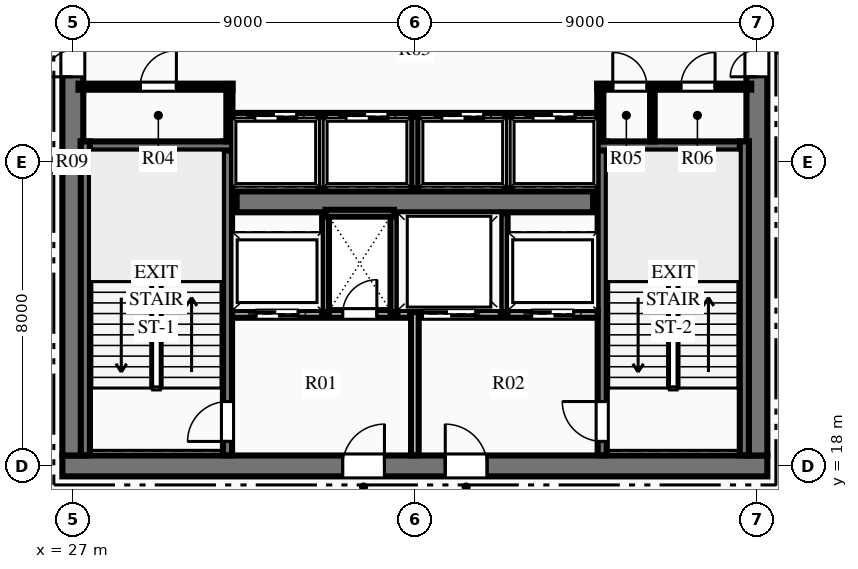
"""IFC4 building model, lengths in metres.
Left out: names, types, materials, properties, quantities, classifications, styles, units other than length and angle.
Written with IfcOpenShell. Run it as: python <this file> out.ifc"""

import sys

from ifc_helpers import new_model, si_unit, direction, frame, frame_2d, origin, place, context, subcontext, project, spatial, rectangle, extrude, element, fill, save


model = new_model("IFC4")
c1 = context("Model", 3, precision=1e-05, world=origin(), true_north=direction((0.0, 1.0)))
c2 = subcontext(c1, "Body", "Model", "MODEL_VIEW")
j1 = project(units=[si_unit("LENGTHUNIT", "METRE"), si_unit("PLANEANGLEUNIT", "RADIAN")], contexts=[c1])
p1 = place(None, origin())
s1 = spatial("IfcSite", under=j1, at=p1, CompositionType="ELEMENT")
p2 = place(p1, origin())
s2 = spatial("IfcBuilding", under=s1, at=p2, CompositionType="ELEMENT")
p3 = place(p2, frame((0.0, 0.0, 105.45)))
s3 = spatial("IfcBuildingStorey", under=s2, at=p3, CompositionType="ELEMENT", Elevation=105.45)
p4 = place(p3, frame((26.725, 18.0, 0.0), z_axis=(0.0, 0.0, 1.0), x_axis=(1.0, 0.0, 0.0)))
e1 = element("IfcWall", 1, at=p4, inside=s3, PredefinedType="SHEAR", context=c2, shape_type="SweptSolid", body=[
    extrude(rectangle(XDim=18.55, YDim=0.55, at=frame_2d((9.275, 0.0))), origin(), (0.0, 0.0, 1.0), 3.75),
])
p5 = place(p4, frame((7.375, 0.0, 0.0)))
e2 = element("IfcOpeningElement", 2, at=p5, cuts=e1, PredefinedType="OPENING", context=c2, shape_type="SweptSolid", body=[
    extrude(rectangle(XDim=1.1, YDim=2.15, at=frame_2d((0.55, 1.075))), frame((0.0, 0.285, 0.0), z_axis=(0.0, -1.0, 0.0), x_axis=(1.0, 0.0, 0.0)), (0.0, 0.0, 1.0), 0.57),
])
p6 = place(p4, frame((10.075, 0.0, 0.0)))
e3 = element("IfcOpeningElement", 3, at=p6, cuts=e1, PredefinedType="OPENING", context=c2, shape_type="SweptSolid", body=[
    extrude(rectangle(XDim=1.1, YDim=2.15, at=frame_2d((0.55, 1.075))), frame((0.0, 0.285, 0.0), z_axis=(0.0, -1.0, 0.0), x_axis=(1.0, 0.0, 0.0)), (0.0, 0.0, 1.0), 0.57),
])
p7 = place(p3, frame((27.0, 18.275, 0.0), z_axis=(0.0, 0.0, 1.0), x_axis=(0.0, 1.0, 0.0)))
e4 = element("IfcWall", 4, at=p7, inside=s3, PredefinedType="SHEAR", context=c2, shape_type="SweptSolid", body=[
    extrude(rectangle(XDim=15.45, YDim=0.55, at=frame_2d((7.725, 0.0))), origin(), (0.0, 0.0, 1.0), 3.75),
])
p8 = place(p7, frame((9.965, 0.0, 0.0)))
e5 = element("IfcOpeningElement", 5, at=p8, cuts=e4, PredefinedType="OPENING", context=c2, shape_type="SweptSolid", body=[
    extrude(rectangle(XDim=1.4, YDim=2.2, at=frame_2d((0.7, 1.1))), frame((0.0, 0.285, 0.0), z_axis=(0.0, -1.0, 0.0), x_axis=(1.0, 0.0, 0.0)), (0.0, 0.0, 1.0), 0.57),
])
p9 = place(p3, frame((45.0, 18.275, 0.0), z_axis=(0.0, 0.0, 1.0), x_axis=(0.0, 1.0, 0.0)))
e6 = element("IfcWall", 6, at=p9, inside=s3, PredefinedType="SHEAR", context=c2, shape_type="SweptSolid", body=[
    extrude(rectangle(XDim=15.45, YDim=0.55, at=frame_2d((7.725, 0.0))), origin(), (0.0, 0.0, 1.0), 3.75),
])
p10 = place(p9, frame((9.965, 0.0, 0.0)))
e7 = element("IfcOpeningElement", 7, at=p10, cuts=e6, PredefinedType="OPENING", context=c2, shape_type="SweptSolid", body=[
    extrude(rectangle(XDim=1.4, YDim=2.2, at=frame_2d((0.7, 1.1))), frame((0.0, 0.285, 0.0), z_axis=(0.0, -1.0, 0.0), x_axis=(1.0, 0.0, 0.0)), (0.0, 0.0, 1.0), 0.57),
])
p11 = place(p3, frame((31.31, 24.95, 0.0), z_axis=(0.0, 0.0, 1.0), x_axis=(1.0, 0.0, 0.0)))
e8 = element("IfcWall", 8, at=p11, inside=s3, PredefinedType="SHEAR", context=c2, shape_type="SweptSolid", body=[
    extrude(rectangle(XDim=9.38, YDim=0.55, at=frame_2d((4.69, 0.0))), origin(), (0.0, 0.0, 1.0), 3.75),
])
p12 = place(p3, frame((31.07, 18.28, 0.0), z_axis=(0.0, 0.0, 1.0), x_axis=(0.0, 1.0, 0.0)))
e9 = element("IfcWall", 9, at=p12, inside=s3, PredefinedType="SHEAR", context=c2, shape_type="SweptSolid", body=[
    extrude(rectangle(XDim=8.26, YDim=0.24, at=frame_2d((4.13, 0.0))), origin(), (0.0, 0.0, 1.0), 3.75),
])
p13 = place(p12, frame((0.365, 0.0, 0.0)))
e10 = element("IfcOpeningElement", 10, at=p13, cuts=e9, PredefinedType="OPENING", context=c2, shape_type="SweptSolid", body=[
    extrude(rectangle(XDim=1.05, YDim=2.15, at=frame_2d((0.525, 1.075))), frame((0.0, 0.13, 0.0), z_axis=(0.0, -1.0, 0.0), x_axis=(1.0, 0.0, 0.0)), (0.0, 0.0, 1.0), 0.26),
])
p14 = place(p3, frame((27.21, 26.42, 0.0), z_axis=(0.0, 0.0, 1.0), x_axis=(1.0, 0.0, 0.0)))
e11 = element("IfcWall", 11, at=p14, inside=s3, PredefinedType="SHEAR", context=c2, shape_type="SweptSolid", body=[
    extrude(rectangle(XDim=3.98, YDim=0.24, at=frame_2d((1.99, 0.0))), origin(), (0.0, 0.0, 1.0), 3.75),
])
p15 = place(p3, frame((27.33, 18.28, 0.0), z_axis=(0.0, 0.0, 1.0), x_axis=(0.0, 1.0, 0.0)))
e12 = element("IfcWall", 12, at=p15, inside=s3, PredefinedType="SHEAR", context=c2, shape_type="SweptSolid", body=[
    extrude(rectangle(XDim=8.26, YDim=0.24, at=frame_2d((4.13, 0.0))), origin(), (0.0, 0.0, 1.0), 3.75),
])
p16 = place(p3, frame((40.93, 18.28, 0.0), z_axis=(0.0, 0.0, 1.0), x_axis=(0.0, 1.0, 0.0)))
e13 = element("IfcWall", 13, at=p16, inside=s3, PredefinedType="SHEAR", context=c2, shape_type="SweptSolid", body=[
    extrude(rectangle(XDim=8.26, YDim=0.24, at=frame_2d((4.13, 0.0))), origin(), (0.0, 0.0, 1.0), 3.75),
])
p17 = place(p16, frame((0.365, 0.0, 0.0)))
e14 = element("IfcOpeningElement", 14, at=p17, cuts=e13, PredefinedType="OPENING", context=c2, shape_type="SweptSolid", body=[
    extrude(rectangle(XDim=1.05, YDim=2.15, at=frame_2d((0.525, 1.075))), frame((0.0, 0.13, 0.0), z_axis=(0.0, -1.0, 0.0), x_axis=(1.0, 0.0, 0.0)), (0.0, 0.0, 1.0), 0.26),
])
p18 = place(p3, frame((40.81, 26.42, 0.0), z_axis=(0.0, 0.0, 1.0), x_axis=(1.0, 0.0, 0.0)))
e15 = element("IfcWall", 15, at=p18, inside=s3, PredefinedType="SHEAR", context=c2, shape_type="SweptSolid", body=[
    extrude(rectangle(XDim=3.98, YDim=0.24, at=frame_2d((1.99, 0.0))), origin(), (0.0, 0.0, 1.0), 3.75),
])
p19 = place(p3, frame((44.67, 18.28, 0.0), z_axis=(0.0, 0.0, 1.0), x_axis=(0.0, 1.0, 0.0)))
e16 = element("IfcWall", 16, at=p19, inside=s3, PredefinedType="SHEAR", context=c2, shape_type="SweptSolid", body=[
    extrude(rectangle(XDim=8.26, YDim=0.24, at=frame_2d((4.13, 0.0))), origin(), (0.0, 0.0, 1.0), 3.75),
])
p20 = place(p3, frame((36.0, 18.28, 0.0), z_axis=(0.0, 0.0, 1.0), x_axis=(0.0, 1.0, 0.0)))
e17 = element("IfcWall", 17, at=p20, inside=s3, PredefinedType="PARTITIONING", context=c2, shape_type="SweptSolid", body=[
    extrude(rectangle(XDim=3.77, YDim=0.2, at=frame_2d((1.885, 0.0))), origin(), (0.0, 0.0, 1.0), 3.45),
])
p21 = place(p3, frame((31.19, 22.0, 0.0), z_axis=(0.0, 0.0, 1.0), x_axis=(1.0, 0.0, 0.0)))
e18 = element("IfcWall", 18, at=p21, inside=s3, PredefinedType="PARTITIONING", context=c2, shape_type="SweptSolid", body=[
    extrude(rectangle(XDim=4.69, YDim=0.2, at=frame_2d((2.345, 0.0))), origin(), (0.0, 0.0, 1.0), 3.45),
])
p22 = place(p21, frame((2.91, 0.0, 0.0)))
e19 = element("IfcOpeningElement", 19, at=p22, cuts=e18, PredefinedType="OPENING", context=c2, shape_type="SweptSolid", body=[
    extrude(rectangle(XDim=0.9, YDim=2.15, at=frame_2d((0.45, 1.075))), frame((0.0, 0.11, 0.0), z_axis=(0.0, -1.0, 0.0), x_axis=(1.0, 0.0, 0.0)), (0.0, 0.0, 1.0), 0.22),
])
p23 = place(p21, frame((0.635, 0.0, 0.0)))
e20 = element("IfcOpeningElement", 20, at=p23, cuts=e18, PredefinedType="OPENING", context=c2, shape_type="SweptSolid", body=[
    extrude(rectangle(XDim=1.1, YDim=2.15, at=frame_2d((0.55, 1.075))), frame((0.0, 0.11, 0.0), z_axis=(0.0, -1.0, 0.0), x_axis=(1.0, 0.0, 0.0)), (0.0, 0.0, 1.0), 0.22),
])
p24 = place(p3, frame((36.12, 22.0, 0.0), z_axis=(0.0, 0.0, 1.0), x_axis=(1.0, 0.0, 0.0)))
e21 = element("IfcWall", 21, at=p24, inside=s3, PredefinedType="PARTITIONING", context=c2, shape_type="SweptSolid", body=[
    extrude(rectangle(XDim=4.69, YDim=0.2, at=frame_2d((2.345, 0.0))), origin(), (0.0, 0.0, 1.0), 3.45),
])
p25 = place(p24, frame((2.955, 0.0, 0.0)))
e22 = element("IfcOpeningElement", 22, at=p25, cuts=e21, PredefinedType="OPENING", context=c2, shape_type="SweptSolid", body=[
    extrude(rectangle(XDim=1.1, YDim=2.15, at=frame_2d((0.55, 1.075))), frame((0.0, 0.11, 0.0), z_axis=(0.0, -1.0, 0.0), x_axis=(1.0, 0.0, 0.0)), (0.0, 0.0, 1.0), 0.22),
])
p26 = place(p24, frame((0.08, 0.0, 0.0)))
e23 = element("IfcOpeningElement", 23, at=p26, cuts=e21, PredefinedType="OPENING", context=c2, shape_type="SweptSolid", body=[
    extrude(rectangle(XDim=1.4, YDim=2.2, at=frame_2d((0.7, 1.1))), frame((0.0, 0.11, 0.0), z_axis=(0.0, -1.0, 0.0), x_axis=(1.0, 0.0, 0.0)), (0.0, 0.0, 1.0), 0.22),
])
for number, where, z_axis, x_axis in (
    (24, (33.65, 22.05, 0.0), (0.0, 0.0, 1.0), (0.0, 1.0, 0.0)),
    (25, (35.45, 22.05, 0.0), (0.0, 0.0, 1.0), (0.0, 1.0, 0.0)),
):
    element("IfcWall", number, at=place(p3, frame(where, z_axis=z_axis, x_axis=x_axis)), inside=s3, PredefinedType="PARTITIONING", context=c2, shape_type="SweptSolid", body=[
        extrude(rectangle(XDim=2.6, YDim=0.18, at=frame_2d((1.3, 0.0))), origin(), (0.0, 0.0, 1.0), 3.45),
    ])
p27 = place(p3, frame((33.65, 24.65, 0.0), z_axis=(0.0, 0.0, 1.0), x_axis=(1.0, 0.0, 0.0)))
e26 = element("IfcWall", 26, at=p27, inside=s3, PredefinedType="PARTITIONING", context=c2, shape_type="SweptSolid", body=[
    extrude(rectangle(XDim=1.8, YDim=0.18, at=frame_2d((0.9, 0.0))), origin(), (0.0, 0.0, 1.0), 3.45),
])
p28 = place(p3, frame((38.35, 22.05, 0.0), z_axis=(0.0, 0.0, 1.0), x_axis=(0.0, 1.0, 0.0)))
e27 = element("IfcWall", 27, at=p28, inside=s3, PredefinedType="PARTITIONING", context=c2, shape_type="SweptSolid", body=[
    extrude(rectangle(XDim=2.6, YDim=0.18, at=frame_2d((1.3, 0.0))), origin(), (0.0, 0.0, 1.0), 3.45),
])
p29 = place(p3, frame((27.15, 27.98, 0.0), z_axis=(0.0, 0.0, 1.0), x_axis=(1.0, 0.0, 0.0)))
e28 = element("IfcWall", 28, at=p29, inside=s3, PredefinedType="PARTITIONING", context=c2, shape_type="SweptSolid", body=[
    extrude(rectangle(XDim=4.05, YDim=0.16, at=frame_2d((2.025, 0.0))), origin(), (0.0, 0.0, 1.0), 3.45),
])
p30 = place(p29, frame((1.625, 0.0, 0.0)))
e29 = element("IfcOpeningElement", 29, at=p30, cuts=e28, PredefinedType="OPENING", context=c2, shape_type="SweptSolid", body=[
    extrude(rectangle(XDim=0.95, YDim=2.15, at=frame_2d((0.475, 1.075))), frame((0.0, 0.09, 0.0), z_axis=(0.0, -1.0, 0.0), x_axis=(1.0, 0.0, 0.0)), (0.0, 0.0, 1.0), 0.18),
])
p31 = place(p3, frame((31.12, 26.54, 0.0), z_axis=(0.0, 0.0, 1.0), x_axis=(0.0, 1.0, 0.0)))
e30 = element("IfcWall", 30, at=p31, inside=s3, PredefinedType="PARTITIONING", context=c2, shape_type="SweptSolid", body=[
    extrude(rectangle(XDim=1.51, YDim=0.16, at=frame_2d((0.755, 0.0))), origin(), (0.0, 0.0, 1.0), 3.45),
])
p32 = place(p3, frame((40.8, 27.98, 0.0), z_axis=(0.0, 0.0, 1.0), x_axis=(1.0, 0.0, 0.0)))
e31 = element("IfcWall", 31, at=p32, inside=s3, PredefinedType="PARTITIONING", context=c2, shape_type="SweptSolid", body=[
    extrude(rectangle(XDim=4.05, YDim=0.16, at=frame_2d((2.025, 0.0))), origin(), (0.0, 0.0, 1.0), 3.45),
])
p33 = place(p32, frame((0.407, 0.0, 0.0)))
e32 = element("IfcOpeningElement", 32, at=p33, cuts=e31, PredefinedType="OPENING", context=c2, shape_type="SweptSolid", body=[
    extrude(rectangle(XDim=0.9, YDim=2.15, at=frame_2d((0.45, 1.075))), frame((0.0, 0.09, 0.0), z_axis=(0.0, -1.0, 0.0), x_axis=(1.0, 0.0, 0.0)), (0.0, 0.0, 1.0), 0.18),
])
p34 = place(p32, frame((2.2, 0.0, 0.0)))
e33 = element("IfcOpeningElement", 33, at=p34, cuts=e31, PredefinedType="OPENING", context=c2, shape_type="SweptSolid", body=[
    extrude(rectangle(XDim=0.9, YDim=2.15, at=frame_2d((0.45, 1.075))), frame((0.0, 0.09, 0.0), z_axis=(0.0, -1.0, 0.0), x_axis=(1.0, 0.0, 0.0)), (0.0, 0.0, 1.0), 0.18),
])
p35 = place(p3, frame((40.88, 26.54, 0.0), z_axis=(0.0, 0.0, 1.0), x_axis=(0.0, 1.0, 0.0)))
e34 = element("IfcWall", 34, at=p35, inside=s3, PredefinedType="PARTITIONING", context=c2, shape_type="SweptSolid", body=[
    extrude(rectangle(XDim=1.51, YDim=0.16, at=frame_2d((0.755, 0.0))), origin(), (0.0, 0.0, 1.0), 3.45),
])
p36 = place(p3, frame((42.25, 26.54, 0.0), z_axis=(0.0, 0.0, 1.0), x_axis=(0.0, 1.0, 0.0)))
e35 = element("IfcWall", 35, at=p36, inside=s3, PredefinedType="PARTITIONING", context=c2, shape_type="SweptSolid", body=[
    extrude(rectangle(XDim=1.44, YDim=0.12, at=frame_2d((0.72, 0.0))), origin(), (0.0, 0.0, 1.0), 3.45),
])
p37 = place(p3, frame((31.2, 27.2, 0.0), z_axis=(0.0, 0.0, 1.0), x_axis=(1.0, 0.0, 0.0)))
e36 = element("IfcWall", 36, at=p37, inside=s3, PredefinedType="PARTITIONING", context=c2, shape_type="SweptSolid", body=[
    extrude(rectangle(XDim=9.6, YDim=0.18, at=frame_2d((4.8, 0.0))), origin(), (0.0, 0.0, 1.0), 3.45),
])
p38 = place(p37, frame((0.59, 0.0, 0.0)))
e37 = element("IfcOpeningElement", 37, at=p38, cuts=e36, PredefinedType="OPENING", context=c2, shape_type="SweptSolid", body=[
    extrude(rectangle(XDim=1.1, YDim=2.15, at=frame_2d((0.55, 1.075))), frame((0.0, 0.1, 0.0), z_axis=(0.0, -1.0, 0.0), x_axis=(1.0, 0.0, 0.0)), (0.0, 0.0, 1.0), 0.2),
])
p39 = place(p37, frame((2.99, 0.0, 0.0)))
e38 = element("IfcOpeningElement", 38, at=p39, cuts=e36, PredefinedType="OPENING", context=c2, shape_type="SweptSolid", body=[
    extrude(rectangle(XDim=1.1, YDim=2.15, at=frame_2d((0.55, 1.075))), frame((0.0, 0.1, 0.0), z_axis=(0.0, -1.0, 0.0), x_axis=(1.0, 0.0, 0.0)), (0.0, 0.0, 1.0), 0.2),
])
p40 = place(p37, frame((5.51, 0.0, 0.0)))
e39 = element("IfcOpeningElement", 39, at=p40, cuts=e36, PredefinedType="OPENING", context=c2, shape_type="SweptSolid", body=[
    extrude(rectangle(XDim=1.1, YDim=2.15, at=frame_2d((0.55, 1.075))), frame((0.0, 0.1, 0.0), z_axis=(0.0, -1.0, 0.0), x_axis=(1.0, 0.0, 0.0)), (0.0, 0.0, 1.0), 0.2),
])
p41 = place(p37, frame((7.91, 0.0, 0.0)))
e40 = element("IfcOpeningElement", 40, at=p41, cuts=e36, PredefinedType="OPENING", context=c2, shape_type="SweptSolid", body=[
    extrude(rectangle(XDim=1.1, YDim=2.15, at=frame_2d((0.55, 1.075))), frame((0.0, 0.1, 0.0), z_axis=(0.0, -1.0, 0.0), x_axis=(1.0, 0.0, 0.0)), (0.0, 0.0, 1.0), 0.2),
])
for number, where, z_axis, x_axis in (
    (41, (33.54, 25.3, 0.0), (0.0, 0.0, 1.0), (0.0, 1.0, 0.0)),
    (42, (36.0, 25.3, 0.0), (0.0, 0.0, 1.0), (0.0, 1.0, 0.0)),
    (43, (38.46, 25.3, 0.0), (0.0, 0.0, 1.0), (0.0, 1.0, 0.0)),
):
    element("IfcWall", number, at=place(p3, frame(where, z_axis=z_axis, x_axis=x_axis)), inside=s3, PredefinedType="PARTITIONING", context=c2, shape_type="SweptSolid", body=[
        extrude(rectangle(XDim=1.9, YDim=0.18, at=frame_2d((0.95, 0.0))), origin(), (0.0, 0.0, 1.0), 3.45),
    ])
p42 = place(p30, origin())
e44 = element("IfcDoor", 44, at=p42, inside=s3, OperationType="SINGLE_SWING_RIGHT", PredefinedType="DOOR", context=c2, shape_type="SweptSolid", body=[
    extrude(rectangle(XDim=0.95, YDim=2.15, at=frame_2d((0.475, 1.075))), frame((0.0, 0.025, 0.0), z_axis=(0.0, -1.0, 0.0), x_axis=(1.0, 0.0, 0.0)), (0.0, 0.0, 1.0), 0.05),
])
fill(e29, e44)
p43 = place(p33, origin())
e45 = element("IfcDoor", 45, at=p43, inside=s3, OperationType="SINGLE_SWING_LEFT", PredefinedType="DOOR", context=c2, shape_type="SweptSolid", body=[
    extrude(rectangle(XDim=0.9, YDim=2.15, at=frame_2d((0.45, 1.075))), frame((0.0, 0.025, 0.0), z_axis=(0.0, -1.0, 0.0), x_axis=(1.0, 0.0, 0.0)), (0.0, 0.0, 1.0), 0.05),
])
fill(e32, e45)
p44 = place(p34, origin())
e46 = element("IfcDoor", 46, at=p44, inside=s3, OperationType="SINGLE_SWING_RIGHT", PredefinedType="DOOR", context=c2, shape_type="SweptSolid", body=[
    extrude(rectangle(XDim=0.9, YDim=2.15, at=frame_2d((0.45, 1.075))), frame((0.0, 0.025, 0.0), z_axis=(0.0, -1.0, 0.0), x_axis=(1.0, 0.0, 0.0)), (0.0, 0.0, 1.0), 0.05),
])
fill(e33, e46)
p45 = place(p13, origin())
e47 = element("IfcDoor", 47, at=p45, inside=s3, OperationType="SINGLE_SWING_LEFT", PredefinedType="DOOR", context=c2, shape_type="SweptSolid", body=[
    extrude(rectangle(XDim=1.05, YDim=2.15, at=frame_2d((0.525, 1.075))), frame((0.0, 0.025, 0.0), z_axis=(0.0, -1.0, 0.0), x_axis=(1.0, 0.0, 0.0)), (0.0, 0.0, 1.0), 0.05),
])
fill(e10, e47)
p46 = place(p17, origin())
e48 = element("IfcDoor", 48, at=p46, inside=s3, OperationType="SINGLE_SWING_RIGHT", PredefinedType="DOOR", context=c2, shape_type="SweptSolid", body=[
    extrude(rectangle(XDim=1.05, YDim=2.15, at=frame_2d((0.525, 1.075))), frame((0.0, 0.025, 0.0), z_axis=(0.0, -1.0, 0.0), x_axis=(1.0, 0.0, 0.0)), (0.0, 0.0, 1.0), 0.05),
])
fill(e14, e48)
p47 = place(p5, origin())
e49 = element("IfcDoor", 49, at=p47, inside=s3, OperationType="SINGLE_SWING_RIGHT", PredefinedType="DOOR", context=c2, shape_type="SweptSolid", body=[
    extrude(rectangle(XDim=1.1, YDim=2.15, at=frame_2d((0.55, 1.075))), frame((0.0, 0.025, 0.0), z_axis=(0.0, -1.0, 0.0), x_axis=(1.0, 0.0, 0.0)), (0.0, 0.0, 1.0), 0.05),
])
fill(e2, e49)
p48 = place(p6, origin())
e50 = element("IfcDoor", 50, at=p48, inside=s3, OperationType="SINGLE_SWING_LEFT", PredefinedType="DOOR", context=c2, shape_type="SweptSolid", body=[
    extrude(rectangle(XDim=1.1, YDim=2.15, at=frame_2d((0.55, 1.075))), frame((0.0, 0.025, 0.0), z_axis=(0.0, -1.0, 0.0), x_axis=(1.0, 0.0, 0.0)), (0.0, 0.0, 1.0), 0.05),
])
fill(e3, e50)
p49 = place(p22, origin())
e51 = element("IfcDoor", 51, at=p49, inside=s3, OperationType="SINGLE_SWING_RIGHT", PredefinedType="DOOR", context=c2, shape_type="SweptSolid", body=[
    extrude(rectangle(XDim=0.9, YDim=2.15, at=frame_2d((0.45, 1.075))), frame((0.0, 0.025, 0.0), z_axis=(0.0, -1.0, 0.0), x_axis=(1.0, 0.0, 0.0)), (0.0, 0.0, 1.0), 0.05),
])
fill(e19, e51)
p50 = place(p8, origin())
e52 = element("IfcDoor", 52, at=p50, inside=s3, OperationType="DOUBLE_DOOR_SINGLE_SWING", PredefinedType="DOOR", context=c2, shape_type="SweptSolid", body=[
    extrude(rectangle(XDim=1.4, YDim=2.2, at=frame_2d((0.7, 1.1))), frame((0.0, 0.025, 0.0), z_axis=(0.0, -1.0, 0.0), x_axis=(1.0, 0.0, 0.0)), (0.0, 0.0, 1.0), 0.05),
])
fill(e5, e52)
p51 = place(p10, origin())
e53 = element("IfcDoor", 53, at=p51, inside=s3, OperationType="DOUBLE_DOOR_SINGLE_SWING", PredefinedType="DOOR", context=c2, shape_type="SweptSolid", body=[
    extrude(rectangle(XDim=1.4, YDim=2.2, at=frame_2d((0.7, 1.1))), frame((0.0, 0.025, 0.0), z_axis=(0.0, -1.0, 0.0), x_axis=(1.0, 0.0, 0.0)), (0.0, 0.0, 1.0), 0.05),
])
fill(e7, e53)
p52 = place(p38, origin())
e54 = element("IfcDoor", 54, at=p52, inside=s3, OperationType="SLIDING_TO_LEFT", PredefinedType="DOOR", context=c2, shape_type="SweptSolid", body=[
    extrude(rectangle(XDim=1.1, YDim=2.15, at=frame_2d((0.55, 1.075))), frame((0.0, 0.025, 0.0), z_axis=(0.0, -1.0, 0.0), x_axis=(1.0, 0.0, 0.0)), (0.0, 0.0, 1.0), 0.05),
])
fill(e37, e54)
p53 = place(p39, origin())
e55 = element("IfcDoor", 55, at=p53, inside=s3, OperationType="SLIDING_TO_LEFT", PredefinedType="DOOR", context=c2, shape_type="SweptSolid", body=[
    extrude(rectangle(XDim=1.1, YDim=2.15, at=frame_2d((0.55, 1.075))), frame((0.0, 0.025, 0.0), z_axis=(0.0, -1.0, 0.0), x_axis=(1.0, 0.0, 0.0)), (0.0, 0.0, 1.0), 0.05),
])
fill(e38, e55)
p54 = place(p40, origin())
e56 = element("IfcDoor", 56, at=p54, inside=s3, OperationType="SLIDING_TO_LEFT", PredefinedType="DOOR", context=c2, shape_type="SweptSolid", body=[
    extrude(rectangle(XDim=1.1, YDim=2.15, at=frame_2d((0.55, 1.075))), frame((0.0, 0.025, 0.0), z_axis=(0.0, -1.0, 0.0), x_axis=(1.0, 0.0, 0.0)), (0.0, 0.0, 1.0), 0.05),
])
fill(e39, e56)
p55 = place(p41, origin())
e57 = element("IfcDoor", 57, at=p55, inside=s3, OperationType="SLIDING_TO_LEFT", PredefinedType="DOOR", context=c2, shape_type="SweptSolid", body=[
    extrude(rectangle(XDim=1.1, YDim=2.15, at=frame_2d((0.55, 1.075))), frame((0.0, 0.025, 0.0), z_axis=(0.0, -1.0, 0.0), x_axis=(1.0, 0.0, 0.0)), (0.0, 0.0, 1.0), 0.05),
])
fill(e40, e57)
p56 = place(p23, origin())
e58 = element("IfcDoor", 58, at=p56, inside=s3, OperationType="SLIDING_TO_LEFT", PredefinedType="DOOR", context=c2, shape_type="SweptSolid", body=[
    extrude(rectangle(XDim=1.1, YDim=2.15, at=frame_2d((0.55, 1.075))), frame((0.0, 0.025, 0.0), z_axis=(0.0, -1.0, 0.0), x_axis=(1.0, 0.0, 0.0)), (0.0, 0.0, 1.0), 0.05),
])
fill(e20, e58)
p57 = place(p25, origin())
e59 = element("IfcDoor", 59, at=p57, inside=s3, OperationType="SLIDING_TO_LEFT", PredefinedType="DOOR", context=c2, shape_type="SweptSolid", body=[
    extrude(rectangle(XDim=1.1, YDim=2.15, at=frame_2d((0.55, 1.075))), frame((0.0, 0.025, 0.0), z_axis=(0.0, -1.0, 0.0), x_axis=(1.0, 0.0, 0.0)), (0.0, 0.0, 1.0), 0.05),
])
fill(e22, e59)
p58 = place(p26, origin())
e60 = element("IfcDoor", 60, at=p58, inside=s3, OperationType="SLIDING_TO_LEFT", PredefinedType="DOOR", context=c2, shape_type="SweptSolid", body=[
    extrude(rectangle(XDim=1.4, YDim=2.2, at=frame_2d((0.7, 1.1))), frame((0.0, 0.025, 0.0), z_axis=(0.0, -1.0, 0.0), x_axis=(1.0, 0.0, 0.0)), (0.0, 0.0, 1.0), 0.05),
])
fill(e23, e60)
save(model, sys.argv[1])
